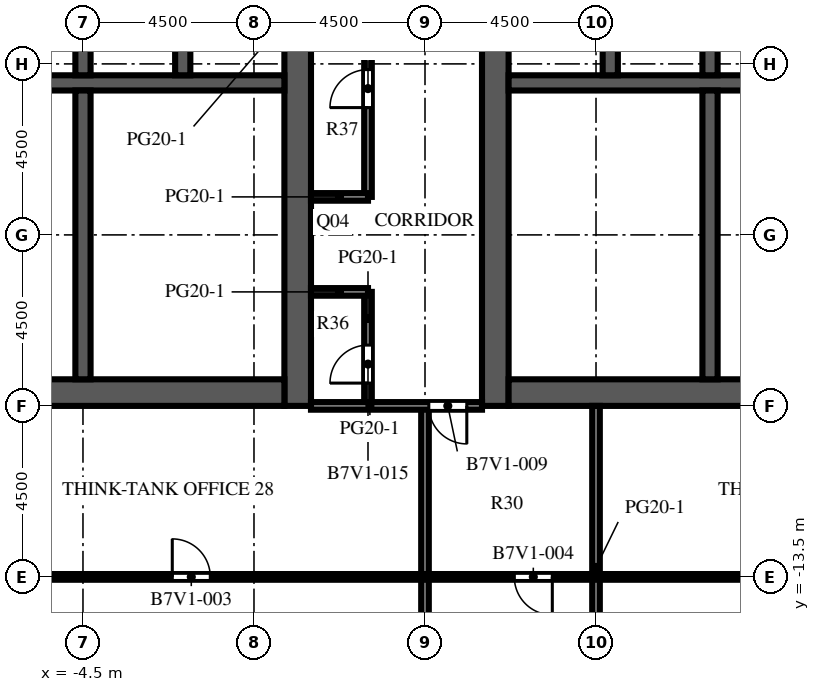
"""IFC4 building model, lengths in metres.
Left out: names, types, materials, properties, quantities, classifications, styles, units other than length and angle.
Written with IfcOpenShell. Run it as: python <this file> out.ifc"""

import sys

from ifc_helpers import new_model, si_unit, direction, frame, frame_2d, origin, place, context, subcontext, project, spatial, rectangle, extrude, element, fill, save


model = new_model("IFC4")
c1 = context("Model", 3, precision=1e-05, world=origin(), true_north=direction((0.0, 1.0)))
c2 = subcontext(c1, "Body", "Model", "MODEL_VIEW")
j1 = project(units=[si_unit("LENGTHUNIT", "METRE"), si_unit("PLANEANGLEUNIT", "RADIAN")], contexts=[c1])
p1 = place(None, origin())
s1 = spatial("IfcSite", under=j1, at=p1, CompositionType="ELEMENT")
p2 = place(p1, origin())
s2 = spatial("IfcBuilding", under=s1, at=p2, CompositionType="ELEMENT")
p3 = place(p2, frame((0.0, 0.0, 243.9)))
s3 = spatial("IfcBuildingStorey", under=s2, at=p3, CompositionType="ELEMENT", Elevation=243.9)
p4 = place(p3, frame((1.15, -9.0, 0.0), z_axis=(0.0, 0.0, 1.0), x_axis=(0.0, 1.0, 0.0)))
e1 = element("IfcWall", 1, at=p4, inside=s3, PredefinedType="SHEAR", context=c2, shape_type="SweptSolid", body=[
    extrude(rectangle(XDim=27.5, YDim=0.7, at=frame_2d((13.75, 0.0))), origin(), (0.0, 0.0, 1.0), 4.1),
])
p5 = place(p4, frame((12.55, 0.0, 0.0)))
e2 = element("IfcOpeningElement", 2, at=p5, cuts=e1, PredefinedType="OPENING", context=c2, shape_type="SweptSolid", body=[
    extrude(rectangle(XDim=2.4, YDim=2.4, at=frame_2d((1.2, 1.2))), frame((0.0, 0.36, 0.0), z_axis=(0.0, -1.0, 0.0), x_axis=(1.0, 0.0, 0.0)), (0.0, 0.0, 1.0), 0.72),
])
p6 = place(p4, frame((3.9, 0.0, 0.0)))
e3 = element("IfcOpeningElement", 3, at=p6, cuts=e1, PredefinedType="OPENING", context=c2, shape_type="SweptSolid", body=[
    extrude(rectangle(XDim=1.2, YDim=2.1, at=frame_2d((0.6, 1.05))), frame((0.0, 0.36, 0.0), z_axis=(0.0, -1.0, 0.0), x_axis=(1.0, 0.0, 0.0)), (0.0, 0.0, 1.0), 0.72),
])
p7 = place(p4, frame((22.4, 0.0, 0.0)))
e4 = element("IfcOpeningElement", 4, at=p7, cuts=e1, PredefinedType="OPENING", context=c2, shape_type="SweptSolid", body=[
    extrude(rectangle(XDim=1.2, YDim=2.1, at=frame_2d((0.6, 1.05))), frame((0.0, 0.36, 0.0), z_axis=(0.0, -1.0, 0.0), x_axis=(1.0, 0.0, 0.0)), (0.0, 0.0, 1.0), 0.72),
])
p8 = place(p3, frame((-9.8, -8.65, 0.0), z_axis=(0.0, 0.0, 1.0), x_axis=(1.0, 0.0, 0.0)))
e5 = element("IfcWall", 5, at=p8, inside=s3, PredefinedType="SHEAR", context=c2, shape_type="SweptSolid", body=[
    extrude(rectangle(XDim=10.6, YDim=0.7, at=frame_2d((5.3, 0.0))), origin(), (0.0, 0.0, 1.0), 4.1),
])
p9 = place(p3, frame((-9.8, -0.5, 0.0), z_axis=(0.0, 0.0, 1.0), x_axis=(1.0, 0.0, 0.0)))
e6 = element("IfcWall", 6, at=p9, inside=s3, PredefinedType="SHEAR", context=c2, shape_type="SweptSolid", body=[
    extrude(rectangle(XDim=10.6, YDim=0.4, at=frame_2d((5.3, 0.0))), origin(), (0.0, 0.0, 1.0), 4.1),
])
for number, where, z_axis, x_axis in (
    (7, (-4.5, -0.3, 0.0), (0.0, 0.0, 1.0), (0.0, 1.0, 0.0)),
    (8, (-1.875, -0.3, 0.0), (0.0, 0.0, 1.0), (0.0, 1.0, 0.0)),
):
    element("IfcWall", number, at=place(p3, frame(where, z_axis=z_axis, x_axis=x_axis)), inside=s3, PredefinedType="SHEAR", context=c2, shape_type="SweptSolid", body=[
        extrude(rectangle(XDim=2.9, YDim=0.4, at=frame_2d((1.45, 0.0))), origin(), (0.0, 0.0, 1.0), 4.1),
    ])
p10 = place(p3, frame((-4.5, -8.3, 0.0), z_axis=(0.0, 0.0, 1.0), x_axis=(0.0, 1.0, 0.0)))
e9 = element("IfcWall", 9, at=p10, inside=s3, PredefinedType="SHEAR", context=c2, shape_type="SweptSolid", body=[
    extrude(rectangle(XDim=7.6, YDim=0.4, at=frame_2d((3.8, 0.0))), origin(), (0.0, 0.0, 1.0), 4.1),
])
p11 = place(p3, frame((6.35, -9.0, 0.0), z_axis=(0.0, 0.0, 1.0), x_axis=(0.0, 1.0, 0.0)))
e10 = element("IfcWall", 10, at=p11, inside=s3, PredefinedType="SHEAR", context=c2, shape_type="SweptSolid", body=[
    extrude(rectangle(XDim=27.5, YDim=0.7, at=frame_2d((13.75, 0.0))), origin(), (0.0, 0.0, 1.0), 4.1),
])
p12 = place(p11, frame((12.55, 0.0, 0.0)))
e11 = element("IfcOpeningElement", 11, at=p12, cuts=e10, PredefinedType="OPENING", context=c2, shape_type="SweptSolid", body=[
    extrude(rectangle(XDim=2.4, YDim=2.4, at=frame_2d((1.2, 1.2))), frame((0.0, 0.36, 0.0), z_axis=(0.0, -1.0, 0.0), x_axis=(1.0, 0.0, 0.0)), (0.0, 0.0, 1.0), 0.72),
])
p13 = place(p11, frame((3.9, 0.0, 0.0)))
e12 = element("IfcOpeningElement", 12, at=p13, cuts=e10, PredefinedType="OPENING", context=c2, shape_type="SweptSolid", body=[
    extrude(rectangle(XDim=1.2, YDim=2.1, at=frame_2d((0.6, 1.05))), frame((0.0, 0.36, 0.0), z_axis=(0.0, -1.0, 0.0), x_axis=(1.0, 0.0, 0.0)), (0.0, 0.0, 1.0), 0.72),
])
p14 = place(p11, frame((22.4, 0.0, 0.0)))
e13 = element("IfcOpeningElement", 13, at=p14, cuts=e10, PredefinedType="OPENING", context=c2, shape_type="SweptSolid", body=[
    extrude(rectangle(XDim=1.2, YDim=2.1, at=frame_2d((0.6, 1.05))), frame((0.0, 0.36, 0.0), z_axis=(0.0, -1.0, 0.0), x_axis=(1.0, 0.0, 0.0)), (0.0, 0.0, 1.0), 0.72),
])
p15 = place(p3, frame((6.7, -8.65, 0.0), z_axis=(0.0, 0.0, 1.0), x_axis=(1.0, 0.0, 0.0)))
e14 = element("IfcWall", 14, at=p15, inside=s3, PredefinedType="SHEAR", context=c2, shape_type="SweptSolid", body=[
    extrude(rectangle(XDim=10.6, YDim=0.7, at=frame_2d((5.3, 0.0))), origin(), (0.0, 0.0, 1.0), 4.1),
])
p16 = place(p3, frame((6.7, -0.5, 0.0), z_axis=(0.0, 0.0, 1.0), x_axis=(1.0, 0.0, 0.0)))
e15 = element("IfcWall", 15, at=p16, inside=s3, PredefinedType="SHEAR", context=c2, shape_type="SweptSolid", body=[
    extrude(rectangle(XDim=10.6, YDim=0.4, at=frame_2d((5.3, 0.0))), origin(), (0.0, 0.0, 1.0), 4.1),
])
for number, where, z_axis, x_axis in (
    (16, (9.375, -0.3, 0.0), (0.0, 0.0, 1.0), (0.0, 1.0, 0.0)),
    (17, (12.0, -0.3, 0.0), (0.0, 0.0, 1.0), (0.0, 1.0, 0.0)),
):
    element("IfcWall", number, at=place(p3, frame(where, z_axis=z_axis, x_axis=x_axis)), inside=s3, PredefinedType="SHEAR", context=c2, shape_type="SweptSolid", body=[
        extrude(rectangle(XDim=2.9, YDim=0.4, at=frame_2d((1.45, 0.0))), origin(), (0.0, 0.0, 1.0), 4.1),
    ])
p17 = place(p3, frame((12.0, -8.3, 0.0), z_axis=(0.0, 0.0, 1.0), x_axis=(0.0, 1.0, 0.0)))
e18 = element("IfcWall", 18, at=p17, inside=s3, PredefinedType="SHEAR", context=c2, shape_type="SweptSolid", body=[
    extrude(rectangle(XDim=7.6, YDim=0.4, at=frame_2d((3.8, 0.0))), origin(), (0.0, 0.0, 1.0), 4.1),
])
p18 = place(p3, frame((-0.7, -8.3, 0.0), z_axis=(0.0, 0.0, 1.0), x_axis=(0.0, 1.0, 0.0)))
e19 = element("IfcWall", 19, at=p18, inside=s3, PredefinedType="PARTITIONING", context=c2, shape_type="SweptSolid", body=[
    extrude(rectangle(XDim=2.584, YDim=0.1, at=frame_2d((1.292, 0.0))), origin(), (0.0, 0.0, 1.0), 3.65),
])
p19 = place(p18, frame((0.792, 0.0, 0.0)))
e20 = element("IfcOpeningElement", 20, at=p19, cuts=e19, PredefinedType="OPENING", context=c2, shape_type="SweptSolid", body=[
    extrude(rectangle(XDim=1.0, YDim=2.1, at=frame_2d((0.5, 1.05))), frame((0.0, 0.06, 0.0), z_axis=(0.0, -1.0, 0.0), x_axis=(1.0, 0.0, 0.0)), (0.0, 0.0, 1.0), 0.12),
])
p20 = place(p3, frame((-0.7, -5.716, 0.0), z_axis=(0.0, 0.0, 1.0), x_axis=(0.0, 1.0, 0.0)))
e21 = element("IfcWall", 21, at=p20, inside=s3, PredefinedType="PARTITIONING", context=c2, shape_type="SweptSolid", body=[
    extrude(rectangle(XDim=2.128, YDim=0.1, at=frame_2d((1.064, 0.0))), origin(), (0.0, 0.0, 1.0), 3.65),
])
p21 = place(p20, frame((0.564, 0.0, 0.0)))
e22 = element("IfcOpeningElement", 22, at=p21, cuts=e21, PredefinedType="OPENING", context=c2, shape_type="SweptSolid", body=[
    extrude(rectangle(XDim=1.0, YDim=2.1, at=frame_2d((0.5, 1.05))), frame((0.0, 0.06, 0.0), z_axis=(0.0, -1.0, 0.0), x_axis=(1.0, 0.0, 0.0)), (0.0, 0.0, 1.0), 0.12),
])
p22 = place(p3, frame((-0.7, -3.588, 0.0), z_axis=(0.0, 0.0, 1.0), x_axis=(0.0, 1.0, 0.0)))
e23 = element("IfcWall", 23, at=p22, inside=s3, PredefinedType="PARTITIONING", context=c2, shape_type="SweptSolid", body=[
    extrude(rectangle(XDim=2.888, YDim=0.1, at=frame_2d((1.444, 0.0))), origin(), (0.0, 0.0, 1.0), 3.65),
])
p23 = place(p22, frame((0.944, 0.0, 0.0)))
e24 = element("IfcOpeningElement", 24, at=p23, cuts=e23, PredefinedType="OPENING", context=c2, shape_type="SweptSolid", body=[
    extrude(rectangle(XDim=1.0, YDim=2.1, at=frame_2d((0.5, 1.05))), frame((0.0, 0.06, 0.0), z_axis=(0.0, -1.0, 0.0), x_axis=(1.0, 0.0, 0.0)), (0.0, 0.0, 1.0), 0.12),
])
for number, where, z_axis, x_axis in (
    (25, (-4.3, -5.716, 0.0), (0.0, 0.0, 1.0), (1.0, 0.0, 0.0)),
    (26, (-4.3, -3.588, 0.0), (0.0, 0.0, 1.0), (1.0, 0.0, 0.0)),
):
    element("IfcWall", number, at=place(p3, frame(where, z_axis=z_axis, x_axis=x_axis)), inside=s3, PredefinedType="PARTITIONING", context=c2, shape_type="SweptSolid", body=[
        extrude(rectangle(XDim=3.6, YDim=0.1, at=frame_2d((1.8, 0.0))), origin(), (0.0, 0.0, 1.0), 3.65),
    ])
p24 = place(p3, frame((8.2, -8.3, 0.0), z_axis=(0.0, 0.0, 1.0), x_axis=(0.0, 1.0, 0.0)))
e27 = element("IfcWall", 27, at=p24, inside=s3, PredefinedType="PARTITIONING", context=c2, shape_type="SweptSolid", body=[
    extrude(rectangle(XDim=2.584, YDim=0.1, at=frame_2d((1.292, 0.0))), origin(), (0.0, 0.0, 1.0), 3.65),
])
p25 = place(p24, frame((0.792, 0.0, 0.0)))
e28 = element("IfcOpeningElement", 28, at=p25, cuts=e27, PredefinedType="OPENING", context=c2, shape_type="SweptSolid", body=[
    extrude(rectangle(XDim=1.0, YDim=2.1, at=frame_2d((0.5, 1.05))), frame((0.0, 0.06, 0.0), z_axis=(0.0, -1.0, 0.0), x_axis=(1.0, 0.0, 0.0)), (0.0, 0.0, 1.0), 0.12),
])
p26 = place(p3, frame((8.2, -5.716, 0.0), z_axis=(0.0, 0.0, 1.0), x_axis=(0.0, 1.0, 0.0)))
e29 = element("IfcWall", 29, at=p26, inside=s3, PredefinedType="PARTITIONING", context=c2, shape_type="SweptSolid", body=[
    extrude(rectangle(XDim=2.128, YDim=0.1, at=frame_2d((1.064, 0.0))), origin(), (0.0, 0.0, 1.0), 3.65),
])
p27 = place(p26, frame((0.564, 0.0, 0.0)))
e30 = element("IfcOpeningElement", 30, at=p27, cuts=e29, PredefinedType="OPENING", context=c2, shape_type="SweptSolid", body=[
    extrude(rectangle(XDim=1.0, YDim=2.1, at=frame_2d((0.5, 1.05))), frame((0.0, 0.06, 0.0), z_axis=(0.0, -1.0, 0.0), x_axis=(1.0, 0.0, 0.0)), (0.0, 0.0, 1.0), 0.12),
])
p28 = place(p3, frame((8.2, -3.588, 0.0), z_axis=(0.0, 0.0, 1.0), x_axis=(0.0, 1.0, 0.0)))
e31 = element("IfcWall", 31, at=p28, inside=s3, PredefinedType="PARTITIONING", context=c2, shape_type="SweptSolid", body=[
    extrude(rectangle(XDim=2.888, YDim=0.1, at=frame_2d((1.444, 0.0))), origin(), (0.0, 0.0, 1.0), 3.65),
])
p29 = place(p28, frame((0.944, 0.0, 0.0)))
e32 = element("IfcOpeningElement", 32, at=p29, cuts=e31, PredefinedType="OPENING", context=c2, shape_type="SweptSolid", body=[
    extrude(rectangle(XDim=1.0, YDim=2.1, at=frame_2d((0.5, 1.05))), frame((0.0, 0.06, 0.0), z_axis=(0.0, -1.0, 0.0), x_axis=(1.0, 0.0, 0.0)), (0.0, 0.0, 1.0), 0.12),
])
for number, where, z_axis, x_axis in (
    (33, (8.2, -5.716, 0.0), (0.0, 0.0, 1.0), (1.0, 0.0, 0.0)),
    (34, (8.2, -3.588, 0.0), (0.0, 0.0, 1.0), (1.0, 0.0, 0.0)),
):
    element("IfcWall", number, at=place(p3, frame(where, z_axis=z_axis, x_axis=x_axis)), inside=s3, PredefinedType="PARTITIONING", context=c2, shape_type="SweptSolid", body=[
        extrude(rectangle(XDim=3.6, YDim=0.1, at=frame_2d((1.8, 0.0))), origin(), (0.0, 0.0, 1.0), 3.65),
    ])
p30 = place(p3, frame((3.0, -9.0, 0.0), z_axis=(0.0, 0.0, 1.0), x_axis=(0.0, 1.0, 0.0)))
e35 = element("IfcWall", 35, at=p30, inside=s3, PredefinedType="PARTITIONING", context=c2, shape_type="SweptSolid", body=[
    extrude(rectangle(XDim=3.0, YDim=0.2, at=frame_2d((1.5, 0.0))), origin(), (0.0, 0.0, 1.0), 3.65),
])
p31 = place(p30, frame((0.6, 0.0, 0.0)))
e36 = element("IfcOpeningElement", 36, at=p31, cuts=e35, PredefinedType="OPENING", context=c2, shape_type="SweptSolid", body=[
    extrude(rectangle(XDim=1.0, YDim=2.1, at=frame_2d((0.5, 1.05))), frame((0.0, 0.11, 0.0), z_axis=(0.0, -1.0, 0.0), x_axis=(1.0, 0.0, 0.0)), (0.0, 0.0, 1.0), 0.22),
])
p32 = place(p3, frame((3.0, -3.5, 0.0), z_axis=(0.0, 0.0, 1.0), x_axis=(0.0, 1.0, 0.0)))
e37 = element("IfcWall", 37, at=p32, inside=s3, PredefinedType="PARTITIONING", context=c2, shape_type="SweptSolid", body=[
    extrude(rectangle(XDim=6.3, YDim=0.2, at=frame_2d((3.15, 0.0))), origin(), (0.0, 0.0, 1.0), 3.65),
])
p33 = place(p32, frame((2.35, 0.0, 0.0)))
e38 = element("IfcOpeningElement", 38, at=p33, cuts=e37, PredefinedType="OPENING", context=c2, shape_type="SweptSolid", body=[
    extrude(rectangle(XDim=1.0, YDim=2.1, at=frame_2d((0.5, 1.05))), frame((0.0, 0.11, 0.0), z_axis=(0.0, -1.0, 0.0), x_axis=(1.0, 0.0, 0.0)), (0.0, 0.0, 1.0), 0.22),
])
p34 = place(p3, frame((4.5, -22.1, 0.0), z_axis=(0.0, 0.0, 1.0), x_axis=(0.0, 1.0, 0.0)))
e39 = element("IfcWall", 39, at=p34, inside=s3, PredefinedType="PARTITIONING", context=c2, shape_type="SweptSolid", body=[
    extrude(rectangle(XDim=13.1, YDim=0.2, at=frame_2d((6.55, 0.0))), origin(), (0.0, 0.0, 1.0), 3.65),
])
p35 = place(p3, frame((9.0, -17.5, 0.0), z_axis=(0.0, 0.0, 1.0), x_axis=(0.0, 1.0, 0.0)))
e40 = element("IfcWall", 40, at=p35, inside=s3, PredefinedType="PARTITIONING", context=c2, shape_type="SweptSolid", body=[
    extrude(rectangle(XDim=8.5, YDim=0.2, at=frame_2d((4.25, 0.0))), origin(), (0.0, 0.0, 1.0), 3.65),
])
p36 = place(p3, frame((21.0, -13.5, 0.0), z_axis=(0.0, 0.0, 1.0), x_axis=(-1.0, 0.0, 0.0)))
e41 = element("IfcWall", 41, at=p36, inside=s3, PredefinedType="PARTITIONING", context=c2, shape_type="SweptSolid", body=[
    extrude(rectangle(XDim=34.5, YDim=0.15, at=frame_2d((17.25, 0.0))), origin(), (0.0, 0.0, 1.0), 3.65),
])
p37 = place(p36, frame((31.65, 0.0, 0.0)))
e42 = element("IfcOpeningElement", 42, at=p37, cuts=e41, PredefinedType="OPENING", context=c2, shape_type="SweptSolid", body=[
    extrude(rectangle(XDim=1.0, YDim=2.1, at=frame_2d((0.5, 1.05))), frame((0.0, 0.085, 0.0), z_axis=(0.0, -1.0, 0.0), x_axis=(1.0, 0.0, 0.0)), (0.0, 0.0, 1.0), 0.17),
])
p38 = place(p36, frame((22.15, 0.0, 0.0)))
e43 = element("IfcOpeningElement", 43, at=p38, cuts=e41, PredefinedType="OPENING", context=c2, shape_type="SweptSolid", body=[
    extrude(rectangle(XDim=1.0, YDim=2.1, at=frame_2d((0.5, 1.05))), frame((0.0, 0.085, 0.0), z_axis=(0.0, -1.0, 0.0), x_axis=(1.0, 0.0, 0.0)), (0.0, 0.0, 1.0), 0.17),
])
p39 = place(p36, frame((13.15, 0.0, 0.0)))
e44 = element("IfcOpeningElement", 44, at=p39, cuts=e41, PredefinedType="OPENING", context=c2, shape_type="SweptSolid", body=[
    extrude(rectangle(XDim=1.0, YDim=2.1, at=frame_2d((0.5, 1.05))), frame((0.0, 0.085, 0.0), z_axis=(0.0, -1.0, 0.0), x_axis=(1.0, 0.0, 0.0)), (0.0, 0.0, 1.0), 0.17),
])
p40 = place(p36, frame((6.15, 0.0, 0.0)))
e45 = element("IfcOpeningElement", 45, at=p40, cuts=e41, PredefinedType="OPENING", context=c2, shape_type="SweptSolid", body=[
    extrude(rectangle(XDim=1.0, YDim=2.1, at=frame_2d((0.5, 1.05))), frame((0.0, 0.085, 0.0), z_axis=(0.0, -1.0, 0.0), x_axis=(1.0, 0.0, 0.0)), (0.0, 0.0, 1.0), 0.17),
])
p41 = place(p3, frame((6.0, -9.0, 0.0), z_axis=(0.0, 0.0, 1.0), x_axis=(-1.0, 0.0, 0.0)))
e46 = element("IfcWall", 46, at=p41, inside=s3, PredefinedType="PARTITIONING", context=c2, shape_type="SweptSolid", body=[
    extrude(rectangle(XDim=4.5, YDim=0.2, at=frame_2d((2.25, 0.0))), origin(), (0.0, 0.0, 1.0), 3.65),
])
p42 = place(p41, frame((0.4, 0.0, 0.0)))
e47 = element("IfcOpeningElement", 47, at=p42, cuts=e46, PredefinedType="OPENING", context=c2, shape_type="SweptSolid", body=[
    extrude(rectangle(XDim=1.0, YDim=2.1, at=frame_2d((0.5, 1.05))), frame((0.0, 0.11, 0.0), z_axis=(0.0, -1.0, 0.0), x_axis=(1.0, 0.0, 0.0)), (0.0, 0.0, 1.0), 0.22),
])
for number, where, z_axis, x_axis in (
    (48, (1.5, -6.0, 0.0), (0.0, 0.0, 1.0), (1.0, 0.0, 0.0)),
    (49, (1.5, -3.5, 0.0), (0.0, 0.0, 1.0), (1.0, 0.0, 0.0)),
):
    element("IfcWall", number, at=place(p3, frame(where, z_axis=z_axis, x_axis=x_axis)), inside=s3, PredefinedType="PARTITIONING", context=c2, shape_type="SweptSolid", body=[
        extrude(rectangle(XDim=1.5, YDim=0.2, at=frame_2d((0.75, 0.0))), origin(), (0.0, 0.0, 1.0), 3.65),
    ])
p43 = place(p6, origin())
e50 = element("IfcDoor", 50, at=p43, inside=s3, OperationType="SINGLE_SWING_LEFT", PredefinedType="DOOR", context=c2, shape_type="SweptSolid", body=[
    extrude(rectangle(XDim=1.2, YDim=2.1, at=frame_2d((0.6, 1.05))), frame((0.0, 0.325, 0.0), z_axis=(0.0, -1.0, 0.0), x_axis=(1.0, 0.0, 0.0)), (0.0, 0.0, 1.0), 0.05),
])
fill(e3, e50)
p44 = place(p19, origin())
e51 = element("IfcDoor", 51, at=p44, inside=s3, OperationType="SINGLE_SWING_RIGHT", PredefinedType="DOOR", context=c2, shape_type="SweptSolid", body=[
    extrude(rectangle(XDim=1.0, YDim=2.1, at=frame_2d((0.5, 1.05))), frame((0.0, 0.025, 0.0), z_axis=(0.0, -1.0, 0.0), x_axis=(1.0, 0.0, 0.0)), (0.0, 0.0, 1.0), 0.05),
])
fill(e20, e51)
p45 = place(p21, origin())
e52 = element("IfcDoor", 52, at=p45, inside=s3, OperationType="SINGLE_SWING_LEFT", PredefinedType="DOOR", context=c2, shape_type="SweptSolid", body=[
    extrude(rectangle(XDim=1.0, YDim=2.1, at=frame_2d((0.5, 1.05))), frame((0.0, 0.025, 0.0), z_axis=(0.0, -1.0, 0.0), x_axis=(1.0, 0.0, 0.0)), (0.0, 0.0, 1.0), 0.05),
])
fill(e22, e52)
p46 = place(p23, origin())
e53 = element("IfcDoor", 53, at=p46, inside=s3, OperationType="SINGLE_SWING_RIGHT", PredefinedType="DOOR", context=c2, shape_type="SweptSolid", body=[
    extrude(rectangle(XDim=1.0, YDim=2.1, at=frame_2d((0.5, 1.05))), frame((0.0, 0.025, 0.0), z_axis=(0.0, -1.0, 0.0), x_axis=(1.0, 0.0, 0.0)), (0.0, 0.0, 1.0), 0.05),
])
fill(e24, e53)
p47 = place(p13, origin())
e54 = element("IfcDoor", 54, at=p47, inside=s3, OperationType="SINGLE_SWING_RIGHT", PredefinedType="DOOR", context=c2, shape_type="SweptSolid", body=[
    extrude(rectangle(XDim=1.2, YDim=2.1, at=frame_2d((0.6, 1.05))), frame((0.0, -0.275, 0.0), z_axis=(0.0, -1.0, 0.0), x_axis=(1.0, 0.0, 0.0)), (0.0, 0.0, 1.0), 0.05),
])
fill(e12, e54)
p48 = place(p25, origin())
e55 = element("IfcDoor", 55, at=p48, inside=s3, OperationType="SINGLE_SWING_LEFT", PredefinedType="DOOR", context=c2, shape_type="SweptSolid", body=[
    extrude(rectangle(XDim=1.0, YDim=2.1, at=frame_2d((0.5, 1.05))), frame((0.0, 0.025, 0.0), z_axis=(0.0, -1.0, 0.0), x_axis=(1.0, 0.0, 0.0)), (0.0, 0.0, 1.0), 0.05),
])
fill(e28, e55)
p49 = place(p27, origin())
e56 = element("IfcDoor", 56, at=p49, inside=s3, OperationType="SINGLE_SWING_RIGHT", PredefinedType="DOOR", context=c2, shape_type="SweptSolid", body=[
    extrude(rectangle(XDim=1.0, YDim=2.1, at=frame_2d((0.5, 1.05))), frame((0.0, 0.025, 0.0), z_axis=(0.0, -1.0, 0.0), x_axis=(1.0, 0.0, 0.0)), (0.0, 0.0, 1.0), 0.05),
])
fill(e30, e56)
p50 = place(p29, origin())
e57 = element("IfcDoor", 57, at=p50, inside=s3, OperationType="SINGLE_SWING_LEFT", PredefinedType="DOOR", context=c2, shape_type="SweptSolid", body=[
    extrude(rectangle(XDim=1.0, YDim=2.1, at=frame_2d((0.5, 1.05))), frame((0.0, 0.025, 0.0), z_axis=(0.0, -1.0, 0.0), x_axis=(1.0, 0.0, 0.0)), (0.0, 0.0, 1.0), 0.05),
])
fill(e32, e57)
p51 = place(p38, origin())
e58 = element("IfcDoor", 58, at=p51, inside=s3, OperationType="SINGLE_SWING_RIGHT", PredefinedType="DOOR", context=c2, shape_type="SweptSolid", body=[
    extrude(rectangle(XDim=1.0, YDim=2.1, at=frame_2d((0.5, 1.05))), frame((0.0, 0.025, 0.0), z_axis=(0.0, -1.0, 0.0), x_axis=(1.0, 0.0, 0.0)), (0.0, 0.0, 1.0), 0.05),
])
fill(e43, e58)
p52 = place(p39, origin())
e59 = element("IfcDoor", 59, at=p52, inside=s3, OperationType="SINGLE_SWING_LEFT", PredefinedType="DOOR", context=c2, shape_type="SweptSolid", body=[
    extrude(rectangle(XDim=1.0, YDim=2.1, at=frame_2d((0.5, 1.05))), frame((0.0, 0.025, 0.0), z_axis=(0.0, -1.0, 0.0), x_axis=(1.0, 0.0, 0.0)), (0.0, 0.0, 1.0), 0.05),
])
fill(e44, e59)
p53 = place(p42, origin())
e60 = element("IfcDoor", 60, at=p53, inside=s3, OperationType="SINGLE_SWING_LEFT", PredefinedType="DOOR", context=c2, shape_type="SweptSolid", body=[
    extrude(rectangle(XDim=1.0, YDim=2.1, at=frame_2d((0.5, 1.05))), frame((0.0, 0.025, 0.0), z_axis=(0.0, -1.0, 0.0), x_axis=(1.0, 0.0, 0.0)), (0.0, 0.0, 1.0), 0.05),
])
fill(e47, e60)
p54 = place(p31, origin())
e61 = element("IfcDoor", 61, at=p54, inside=s3, OperationType="SINGLE_SWING_LEFT", PredefinedType="DOOR", context=c2, shape_type="SweptSolid", body=[
    extrude(rectangle(XDim=1.0, YDim=2.1, at=frame_2d((0.5, 1.05))), frame((0.0, 0.025, 0.0), z_axis=(0.0, -1.0, 0.0), x_axis=(1.0, 0.0, 0.0)), (0.0, 0.0, 1.0), 0.05),
])
fill(e36, e61)
p55 = place(p33, origin())
e62 = element("IfcDoor", 62, at=p55, inside=s3, OperationType="SINGLE_SWING_LEFT", PredefinedType="DOOR", context=c2, shape_type="SweptSolid", body=[
    extrude(rectangle(XDim=1.0, YDim=2.1, at=frame_2d((0.5, 1.05))), frame((0.0, 0.025, 0.0), z_axis=(0.0, -1.0, 0.0), x_axis=(1.0, 0.0, 0.0)), (0.0, 0.0, 1.0), 0.05),
])
fill(e38, e62)
save(model, sys.argv[1])
